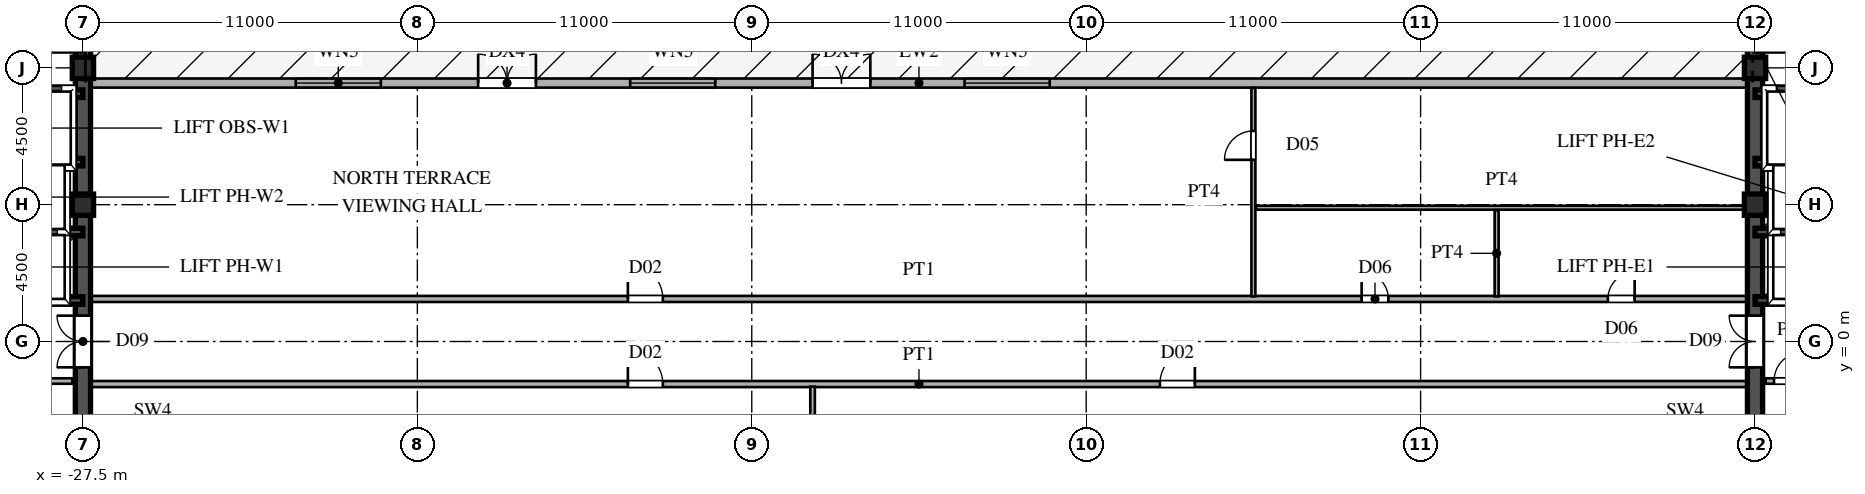
"""IFC4 building model, lengths in metres.
Left out: names, types, materials, properties, quantities, classifications, styles, units other than length and angle.
Written with IfcOpenShell. Run it as: python <this file> out.ifc"""

import sys

from ifc_helpers import new_model, si_unit, direction, frame, frame_2d, origin, origin_2d, place, context, subcontext, project, spatial, rectangle, hollow_rectangle, extrude, source, transform, mapped, element, fill, save


model = new_model("IFC4")
c1 = context("Model", 3, precision=1e-05, world=origin(), true_north=direction((0.0, 1.0)))
c2 = subcontext(c1, "Body", "Model", "MODEL_VIEW")
j1 = project(units=[si_unit("LENGTHUNIT", "METRE"), si_unit("PLANEANGLEUNIT", "RADIAN")], contexts=[c1])
p1 = place(None, origin())
s1 = spatial("IfcSite", under=j1, at=p1, CompositionType="ELEMENT")
p2 = place(p1, origin())
s2 = spatial("IfcBuilding", under=s1, at=p2, CompositionType="ELEMENT")
p3 = place(p2, frame((0.0, 0.0, 274.2)))
s3 = spatial("IfcBuildingStorey", under=s2, at=p3, CompositionType="ELEMENT", Elevation=274.2)
m1 = source(origin(), c2, "Body", "SweptSolid", [
    extrude(hollow_rectangle(XDim=0.7, YDim=0.7, WallThickness=0.03, at=origin_2d()), origin(), (0.0, 0.0, 1.0), 4.8),
])
for number, where, z_axis, x_axis in (
    (1, (-27.5, 4.5, 0.0), (0.0, 0.0, 1.0), (1.0, 0.0, 0.0)),
    (2, (-27.5, 9.0, 0.0), (0.0, 0.0, 1.0), (1.0, 0.0, 0.0)),
    (3, (27.5, 4.5, 0.0), (0.0, 0.0, 1.0), (1.0, 0.0, 0.0)),
    (4, (27.5, 9.0, 0.0), (0.0, 0.0, 1.0), (1.0, 0.0, 0.0)),
):
    element("IfcColumn", number, at=place(p3, frame(where, z_axis=z_axis, x_axis=x_axis)), inside=s3, PredefinedType="COLUMN", context=c2, shape_type="MappedRepresentation", body=[
        mapped(m1, transform((0.0, 0.0, 0.0), scale=1.0)),
    ])
p4 = place(p3, frame((-27.45, 8.5, 0.0), z_axis=(0.0, 0.0, 1.0), x_axis=(1.0, 0.0, 0.0)))
e5 = element("IfcWall", 5, at=p4, inside=s3, PredefinedType="SOLIDWALL", context=c2, shape_type="SweptSolid", body=[
    extrude(rectangle(XDim=54.9, YDim=0.3, at=frame_2d((27.45, 0.0))), origin(), (0.0, 0.0, 1.0), 4.52),
])
p5 = place(p4, frame((12.95, 0.0, 0.0)))
e6 = element("IfcOpeningElement", 6, at=p5, cuts=e5, PredefinedType="OPENING", context=c2, shape_type="SweptSolid", body=[
    extrude(rectangle(XDim=1.9, YDim=2.4, at=frame_2d((0.95, 1.2))), frame((0.0, 0.16, 0.0), z_axis=(0.0, -1.0, 0.0), x_axis=(1.0, 0.0, 0.0)), (0.0, 0.0, 1.0), 0.32),
])
p6 = place(p4, frame((23.95, 0.0, 0.0)))
e7 = element("IfcOpeningElement", 7, at=p6, cuts=e5, PredefinedType="OPENING", context=c2, shape_type="SweptSolid", body=[
    extrude(rectangle(XDim=1.9, YDim=2.4, at=frame_2d((0.95, 1.2))), frame((0.0, 0.16, 0.0), z_axis=(0.0, -1.0, 0.0), x_axis=(1.0, 0.0, 0.0)), (0.0, 0.0, 1.0), 0.32),
])
p7 = place(p4, frame((6.95, 0.0, 0.8)))
e8 = element("IfcOpeningElement", 8, at=p7, cuts=e5, PredefinedType="OPENING", context=c2, shape_type="SweptSolid", body=[
    extrude(rectangle(XDim=2.8, YDim=2.1, at=frame_2d((1.4, 1.05))), frame((0.0, 0.16, 0.0), z_axis=(0.0, -1.0, 0.0), x_axis=(1.0, 0.0, 0.0)), (0.0, 0.0, 1.0), 0.32),
])
p8 = place(p4, frame((17.95, 0.0, 0.8)))
e9 = element("IfcOpeningElement", 9, at=p8, cuts=e5, PredefinedType="OPENING", context=c2, shape_type="SweptSolid", body=[
    extrude(rectangle(XDim=2.8, YDim=2.1, at=frame_2d((1.4, 1.05))), frame((0.0, 0.16, 0.0), z_axis=(0.0, -1.0, 0.0), x_axis=(1.0, 0.0, 0.0)), (0.0, 0.0, 1.0), 0.32),
])
p9 = place(p4, frame((28.95, 0.0, 0.8)))
e10 = element("IfcOpeningElement", 10, at=p9, cuts=e5, PredefinedType="OPENING", context=c2, shape_type="SweptSolid", body=[
    extrude(rectangle(XDim=2.8, YDim=2.1, at=frame_2d((1.4, 1.05))), frame((0.0, 0.16, 0.0), z_axis=(0.0, -1.0, 0.0), x_axis=(1.0, 0.0, 0.0)), (0.0, 0.0, 1.0), 0.32),
])
for number, where, z_axis, x_axis in (
    (11, (-27.5, -13.5, 0.0), (0.0, 0.0, 1.0), (0.0, 1.0, 0.0)),
    (12, (-27.5, 1.3, 0.0), (0.0, 0.0, 1.0), (0.0, 1.0, 0.0)),
):
    element("IfcWall", number, at=place(p3, frame(where, z_axis=z_axis, x_axis=x_axis)), inside=s3, PredefinedType="SHEAR", context=c2, shape_type="SweptSolid", body=[
        extrude(rectangle(XDim=12.2, YDim=0.5, at=frame_2d((6.1, 0.0))), origin(), (0.0, 0.0, 1.0), 4.52),
    ])
p10 = place(p3, frame((-27.5, -1.3, 0.0), z_axis=(0.0, 0.0, 1.0), x_axis=(0.0, 1.0, 0.0)))
e13 = element("IfcWall", 13, at=p10, inside=s3, PredefinedType="SHEAR", context=c2, shape_type="SweptSolid", body=[
    extrude(rectangle(XDim=2.6, YDim=0.5, at=frame_2d((1.3, 0.0))), origin(), (0.0, 0.0, 1.0), 4.52),
])
p11 = place(p10, frame((0.45, 0.0, 0.0)))
e14 = element("IfcOpeningElement", 14, at=p11, cuts=e13, PredefinedType="OPENING", context=c2, shape_type="SweptSolid", body=[
    extrude(rectangle(XDim=1.7, YDim=2.35, at=frame_2d((0.85, 1.175))), frame((0.0, 0.26, 0.0), z_axis=(0.0, -1.0, 0.0), x_axis=(1.0, 0.0, 0.0)), (0.0, 0.0, 1.0), 0.52),
])
for number, where, z_axis, x_axis in (
    (15, (-30.3, 1.35, 0.0), (0.0, 0.0, 1.0), (1.0, 0.0, 0.0)),
    (16, (-30.3, 3.6, 0.0), (0.0, 0.0, 1.0), (1.0, 0.0, 0.0)),
    (17, (-30.3, 5.9, 0.0), (0.0, 0.0, 1.0), (1.0, 0.0, 0.0)),
    (18, (-30.3, 8.15, 0.0), (0.0, 0.0, 1.0), (1.0, 0.0, 0.0)),
):
    element("IfcWall", number, at=place(p3, frame(where, z_axis=z_axis, x_axis=x_axis)), inside=s3, PredefinedType="SHEAR", context=c2, shape_type="SweptSolid", body=[
        extrude(rectangle(XDim=2.8, YDim=0.25, at=frame_2d((1.4, 0.0))), origin(), (0.0, 0.0, 1.0), 4.52),
    ])
p12 = place(p3, frame((-30.3, -1.3, 0.0), z_axis=(0.0, 0.0, 1.0), x_axis=(1.0, 0.0, 0.0)))
e19 = element("IfcWall", 19, at=p12, inside=s3, PredefinedType="PARTITIONING", context=c2, shape_type="SweptSolid", body=[
    extrude(rectangle(XDim=2.45, YDim=0.18, at=frame_2d((1.225, 0.0))), origin(), (0.0, 0.0, 1.0), 4.52),
])
p13 = place(p12, frame((0.275, 0.0, 0.0)))
e20 = element("IfcOpeningElement", 20, at=p13, cuts=e19, PredefinedType="OPENING", context=c2, shape_type="SweptSolid", body=[
    extrude(rectangle(XDim=0.95, YDim=2.15, at=frame_2d((0.475, 1.075))), frame((0.0, 0.1, 0.0), z_axis=(0.0, -1.0, 0.0), x_axis=(1.0, 0.0, 0.0)), (0.0, 0.0, 1.0), 0.2),
])
for number, where, z_axis, x_axis in (
    (21, (27.5, -13.5, 0.0), (0.0, 0.0, 1.0), (0.0, 1.0, 0.0)),
    (22, (27.5, 1.3, 0.0), (0.0, 0.0, 1.0), (0.0, 1.0, 0.0)),
):
    element("IfcWall", number, at=place(p3, frame(where, z_axis=z_axis, x_axis=x_axis)), inside=s3, PredefinedType="SHEAR", context=c2, shape_type="SweptSolid", body=[
        extrude(rectangle(XDim=12.2, YDim=0.5, at=frame_2d((6.1, 0.0))), origin(), (0.0, 0.0, 1.0), 4.52),
    ])
p14 = place(p3, frame((27.5, -1.3, 0.0), z_axis=(0.0, 0.0, 1.0), x_axis=(0.0, 1.0, 0.0)))
e23 = element("IfcWall", 23, at=p14, inside=s3, PredefinedType="SHEAR", context=c2, shape_type="SweptSolid", body=[
    extrude(rectangle(XDim=2.6, YDim=0.5, at=frame_2d((1.3, 0.0))), origin(), (0.0, 0.0, 1.0), 4.52),
])
p15 = place(p14, frame((0.45, 0.0, 0.0)))
e24 = element("IfcOpeningElement", 24, at=p15, cuts=e23, PredefinedType="OPENING", context=c2, shape_type="SweptSolid", body=[
    extrude(rectangle(XDim=1.7, YDim=2.35, at=frame_2d((0.85, 1.175))), frame((0.0, 0.26, 0.0), z_axis=(0.0, -1.0, 0.0), x_axis=(1.0, 0.0, 0.0)), (0.0, 0.0, 1.0), 0.52),
])
for number, where, z_axis, x_axis in (
    (25, (27.5, 1.35, 0.0), (0.0, 0.0, 1.0), (1.0, 0.0, 0.0)),
    (26, (27.5, 3.6, 0.0), (0.0, 0.0, 1.0), (1.0, 0.0, 0.0)),
    (27, (27.5, 5.9, 0.0), (0.0, 0.0, 1.0), (1.0, 0.0, 0.0)),
    (28, (27.5, 8.15, 0.0), (0.0, 0.0, 1.0), (1.0, 0.0, 0.0)),
):
    element("IfcWall", number, at=place(p3, frame(where, z_axis=z_axis, x_axis=x_axis)), inside=s3, PredefinedType="SHEAR", context=c2, shape_type="SweptSolid", body=[
        extrude(rectangle(XDim=2.8, YDim=0.25, at=frame_2d((1.4, 0.0))), origin(), (0.0, 0.0, 1.0), 4.52),
    ])
p16 = place(p3, frame((27.85, -1.3, 0.0), z_axis=(0.0, 0.0, 1.0), x_axis=(1.0, 0.0, 0.0)))
e29 = element("IfcWall", 29, at=p16, inside=s3, PredefinedType="PARTITIONING", context=c2, shape_type="SweptSolid", body=[
    extrude(rectangle(XDim=2.45, YDim=0.18, at=frame_2d((1.225, 0.0))), origin(), (0.0, 0.0, 1.0), 4.52),
])
p17 = place(p16, frame((0.275, 0.0, 0.0)))
e30 = element("IfcOpeningElement", 30, at=p17, cuts=e29, PredefinedType="OPENING", context=c2, shape_type="SweptSolid", body=[
    extrude(rectangle(XDim=0.95, YDim=2.15, at=frame_2d((0.475, 1.075))), frame((0.0, 0.1, 0.0), z_axis=(0.0, -1.0, 0.0), x_axis=(1.0, 0.0, 0.0)), (0.0, 0.0, 1.0), 0.2),
])
p18 = place(p3, frame((-27.245, -1.4, 0.0), z_axis=(0.0, 0.0, 1.0), x_axis=(1.0, 0.0, 0.0)))
e31 = element("IfcWall", 31, at=p18, inside=s3, PredefinedType="PARTITIONING", context=c2, shape_type="SweptSolid", body=[
    extrude(rectangle(XDim=54.49, YDim=0.2, at=frame_2d((27.245, 0.0))), origin(), (0.0, 0.0, 1.0), 4.52),
])
p19 = place(p18, frame((17.67, 0.0, 0.0)))
e32 = element("IfcOpeningElement", 32, at=p19, cuts=e31, PredefinedType="OPENING", context=c2, shape_type="SweptSolid", body=[
    extrude(rectangle(XDim=1.15, YDim=2.2, at=frame_2d((0.575, 1.1))), frame((0.0, 0.11, 0.0), z_axis=(0.0, -1.0, 0.0), x_axis=(1.0, 0.0, 0.0)), (0.0, 0.0, 1.0), 0.22),
])
p20 = place(p18, frame((35.17, 0.0, 0.0)))
e33 = element("IfcOpeningElement", 33, at=p20, cuts=e31, PredefinedType="OPENING", context=c2, shape_type="SweptSolid", body=[
    extrude(rectangle(XDim=1.15, YDim=2.2, at=frame_2d((0.575, 1.1))), frame((0.0, 0.11, 0.0), z_axis=(0.0, -1.0, 0.0), x_axis=(1.0, 0.0, 0.0)), (0.0, 0.0, 1.0), 0.22),
])
p21 = place(p3, frame((-27.245, 1.4, 0.0), z_axis=(0.0, 0.0, 1.0), x_axis=(1.0, 0.0, 0.0)))
e34 = element("IfcWall", 34, at=p21, inside=s3, PredefinedType="PARTITIONING", context=c2, shape_type="SweptSolid", body=[
    extrude(rectangle(XDim=54.49, YDim=0.2, at=frame_2d((27.245, 0.0))), origin(), (0.0, 0.0, 1.0), 4.52),
])
p22 = place(p21, frame((17.67, 0.0, 0.0)))
e35 = element("IfcOpeningElement", 35, at=p22, cuts=e34, PredefinedType="OPENING", context=c2, shape_type="SweptSolid", body=[
    extrude(rectangle(XDim=1.15, YDim=2.2, at=frame_2d((0.575, 1.1))), frame((0.0, 0.11, 0.0), z_axis=(0.0, -1.0, 0.0), x_axis=(1.0, 0.0, 0.0)), (0.0, 0.0, 1.0), 0.22),
])
p23 = place(p21, frame((41.805, 0.0, 0.0)))
e36 = element("IfcOpeningElement", 36, at=p23, cuts=e34, PredefinedType="OPENING", context=c2, shape_type="SweptSolid", body=[
    extrude(rectangle(XDim=0.88, YDim=2.1, at=frame_2d((0.44, 1.05))), frame((0.0, 0.11, 0.0), z_axis=(0.0, -1.0, 0.0), x_axis=(1.0, 0.0, 0.0)), (0.0, 0.0, 1.0), 0.22),
])
p24 = place(p21, frame((49.905, 0.0, 0.0)))
e37 = element("IfcOpeningElement", 37, at=p24, cuts=e34, PredefinedType="OPENING", context=c2, shape_type="SweptSolid", body=[
    extrude(rectangle(XDim=0.88, YDim=2.1, at=frame_2d((0.44, 1.05))), frame((0.0, 0.11, 0.0), z_axis=(0.0, -1.0, 0.0), x_axis=(1.0, 0.0, 0.0)), (0.0, 0.0, 1.0), 0.22),
])
p25 = place(p3, frame((11.085, 4.4, 0.0), z_axis=(0.0, 0.0, 1.0), x_axis=(1.0, 0.0, 0.0)))
e38 = element("IfcWall", 38, at=p25, inside=s3, PredefinedType="PARTITIONING", context=c2, shape_type="SweptSolid", body=[
    extrude(rectangle(XDim=16.16, YDim=0.13, at=frame_2d((8.08, 0.0))), origin(), (0.0, 0.0, 1.0), 4.52),
])
p26 = place(p3, frame((-3.5, -13.5, 0.0), z_axis=(0.0, 0.0, 1.0), x_axis=(0.0, 1.0, 0.0)))
e39 = element("IfcWall", 39, at=p26, inside=s3, PredefinedType="PARTITIONING", context=c2, shape_type="SweptSolid", body=[
    extrude(rectangle(XDim=12.015, YDim=0.15, at=frame_2d((6.007, 0.0))), origin(), (0.0, 0.0, 1.0), 4.52),
])
p27 = place(p3, frame((11.0, 1.485, 0.0), z_axis=(0.0, 0.0, 1.0), x_axis=(0.0, 1.0, 0.0)))
e40 = element("IfcWall", 40, at=p27, inside=s3, PredefinedType="PARTITIONING", context=c2, shape_type="SweptSolid", body=[
    extrude(rectangle(XDim=6.86, YDim=0.13, at=frame_2d((3.43, 0.0))), origin(), (0.0, 0.0, 1.0), 3.22),
])
p28 = place(p27, frame((4.49, 0.0, 0.0)))
e41 = element("IfcOpeningElement", 41, at=p28, cuts=e40, PredefinedType="OPENING", context=c2, shape_type="SweptSolid", body=[
    extrude(rectangle(XDim=0.95, YDim=2.15, at=frame_2d((0.475, 1.075))), frame((0.0, 0.075, 0.0), z_axis=(0.0, -1.0, 0.0), x_axis=(1.0, 0.0, 0.0)), (0.0, 0.0, 1.0), 0.15),
])
p29 = place(p3, frame((19.0, 1.485, 0.0), z_axis=(0.0, 0.0, 1.0), x_axis=(0.0, 1.0, 0.0)))
e42 = element("IfcWall", 42, at=p29, inside=s3, PredefinedType="PARTITIONING", context=c2, shape_type="SweptSolid", body=[
    extrude(rectangle(XDim=2.83, YDim=0.13, at=frame_2d((1.415, 0.0))), origin(), (0.0, 0.0, 1.0), 4.52),
])
m2 = source(origin(), c2, "Body", "SweptSolid", [
    extrude(rectangle(XDim=1.9, YDim=2.4, at=frame_2d((0.95, 1.2))), frame((0.0, 0.025, 0.0), z_axis=(0.0, -1.0, 0.0), x_axis=(1.0, 0.0, 0.0)), (0.0, 0.0, 1.0), 0.05),
])
p30 = place(p5, origin())
e43 = element("IfcDoor", 43, at=p30, inside=s3, OperationType="DOUBLE_SWING_LEFT", PredefinedType="DOOR", context=c2, shape_type="MappedRepresentation", body=[
    mapped(m2, transform((0.0, 0.0, 0.0), scale=1.0)),
])
fill(e6, e43)
p31 = place(p6, origin())
e44 = element("IfcDoor", 44, at=p31, inside=s3, OperationType="DOUBLE_SWING_LEFT", PredefinedType="DOOR", context=c2, shape_type="MappedRepresentation", body=[
    mapped(m2, transform((0.0, 0.0, 0.0), scale=1.0)),
])
fill(e7, e44)
m3 = source(origin(), c2, "Body", "SweptSolid", [
    extrude(rectangle(XDim=2.8, YDim=2.1, at=frame_2d((1.4, 1.05))), frame((0.0, 0.03, 0.0), z_axis=(0.0, -1.0, 0.0), x_axis=(1.0, 0.0, 0.0)), (0.0, 0.0, 1.0), 0.06),
])
p32 = place(p7, origin())
e45 = element("IfcWindow", 45, at=p32, inside=s3, PartitioningType="SINGLE_PANEL", PredefinedType="WINDOW", context=c2, shape_type="MappedRepresentation", body=[
    mapped(m3, transform((0.0, 0.0, 0.0), scale=1.0)),
])
fill(e8, e45)
p33 = place(p8, origin())
e46 = element("IfcWindow", 46, at=p33, inside=s3, PartitioningType="SINGLE_PANEL", PredefinedType="WINDOW", context=c2, shape_type="MappedRepresentation", body=[
    mapped(m3, transform((0.0, 0.0, 0.0), scale=1.0)),
])
fill(e9, e46)
p34 = place(p9, origin())
e47 = element("IfcWindow", 47, at=p34, inside=s3, PartitioningType="SINGLE_PANEL", PredefinedType="WINDOW", context=c2, shape_type="MappedRepresentation", body=[
    mapped(m3, transform((0.0, 0.0, 0.0), scale=1.0)),
])
fill(e10, e47)
m4 = source(origin(), c2, "Body", "SweptSolid", [
    extrude(rectangle(XDim=1.7, YDim=2.35, at=frame_2d((0.85, 1.175))), frame((0.0, 0.025, 0.0), z_axis=(0.0, -1.0, 0.0), x_axis=(1.0, 0.0, 0.0)), (0.0, 0.0, 1.0), 0.05),
])
p35 = place(p11, origin())
e48 = element("IfcDoor", 48, at=p35, inside=s3, OperationType="DOUBLE_SWING_LEFT", PredefinedType="DOOR", context=c2, shape_type="MappedRepresentation", body=[
    mapped(m4, transform((0.0, 0.0, 0.0), scale=1.0)),
])
fill(e14, e48)
p36 = place(p15, origin())
e49 = element("IfcDoor", 49, at=p36, inside=s3, OperationType="DOUBLE_SWING_LEFT", PredefinedType="DOOR", context=c2, shape_type="MappedRepresentation", body=[
    mapped(m4, transform((0.0, 0.0, 0.0), scale=1.0)),
])
fill(e24, e49)
m5 = source(origin(), c2, "Body", "SweptSolid", [
    extrude(rectangle(XDim=0.95, YDim=2.15, at=frame_2d((0.475, 1.075))), frame((0.0, 0.025, 0.0), z_axis=(0.0, -1.0, 0.0), x_axis=(1.0, 0.0, 0.0)), (0.0, 0.0, 1.0), 0.05),
])
p37 = place(p17, origin())
e50 = element("IfcDoor", 50, at=p37, inside=s3, OperationType="SINGLE_SWING_RIGHT", PredefinedType="DOOR", context=c2, shape_type="MappedRepresentation", body=[
    mapped(m5, transform((0.0, 0.0, 0.0), scale=1.0)),
])
fill(e30, e50)
m6 = source(origin(), c2, "Body", "SweptSolid", [
    extrude(rectangle(XDim=1.15, YDim=2.2, at=frame_2d((0.575, 1.1))), frame((0.0, 0.025, 0.0), z_axis=(0.0, -1.0, 0.0), x_axis=(1.0, 0.0, 0.0)), (0.0, 0.0, 1.0), 0.05),
])
p38 = place(p19, origin())
e51 = element("IfcDoor", 51, at=p38, inside=s3, OperationType="SINGLE_SWING_LEFT", PredefinedType="DOOR", context=c2, shape_type="MappedRepresentation", body=[
    mapped(m6, transform((0.0, 0.0, 0.0), scale=1.0)),
])
fill(e32, e51)
p39 = place(p20, origin())
e52 = element("IfcDoor", 52, at=p39, inside=s3, OperationType="SINGLE_SWING_RIGHT", PredefinedType="DOOR", context=c2, shape_type="MappedRepresentation", body=[
    mapped(m6, transform((0.0, 0.0, 0.0), scale=1.0)),
])
fill(e33, e52)
p40 = place(p22, origin())
e53 = element("IfcDoor", 53, at=p40, inside=s3, OperationType="SINGLE_SWING_LEFT", PredefinedType="DOOR", context=c2, shape_type="MappedRepresentation", body=[
    mapped(m6, transform((0.0, 0.0, 0.0), scale=1.0)),
])
fill(e35, e53)
m7 = source(origin(), c2, "Body", "SweptSolid", [
    extrude(rectangle(XDim=0.88, YDim=2.1, at=frame_2d((0.44, 1.05))), frame((0.0, 0.025, 0.0), z_axis=(0.0, -1.0, 0.0), x_axis=(1.0, 0.0, 0.0)), (0.0, 0.0, 1.0), 0.05),
])
p41 = place(p23, origin())
e54 = element("IfcDoor", 54, at=p41, inside=s3, OperationType="SINGLE_SWING_LEFT", PredefinedType="DOOR", context=c2, shape_type="MappedRepresentation", body=[
    mapped(m7, transform((0.0, 0.0, 0.0), scale=1.0)),
])
fill(e36, e54)
p42 = place(p24, origin())
e55 = element("IfcDoor", 55, at=p42, inside=s3, OperationType="SINGLE_SWING_RIGHT", PredefinedType="DOOR", context=c2, shape_type="MappedRepresentation", body=[
    mapped(m7, transform((0.0, 0.0, 0.0), scale=1.0)),
])
fill(e37, e55)
m8 = source(origin(), c2, "Body", "SweptSolid", [
    extrude(rectangle(XDim=0.95, YDim=2.15, at=frame_2d((0.475, 1.075))), frame((0.0, 0.025, 0.0), z_axis=(0.0, -1.0, 0.0), x_axis=(1.0, 0.0, 0.0)), (0.0, 0.0, 1.0), 0.05),
])
p43 = place(p28, origin())
e56 = element("IfcDoor", 56, at=p43, inside=s3, OperationType="SINGLE_SWING_LEFT", PredefinedType="DOOR", context=c2, shape_type="MappedRepresentation", body=[
    mapped(m8, transform((0.0, 0.0, 0.0), scale=1.0)),
])
fill(e41, e56)
save(model, sys.argv[1])
